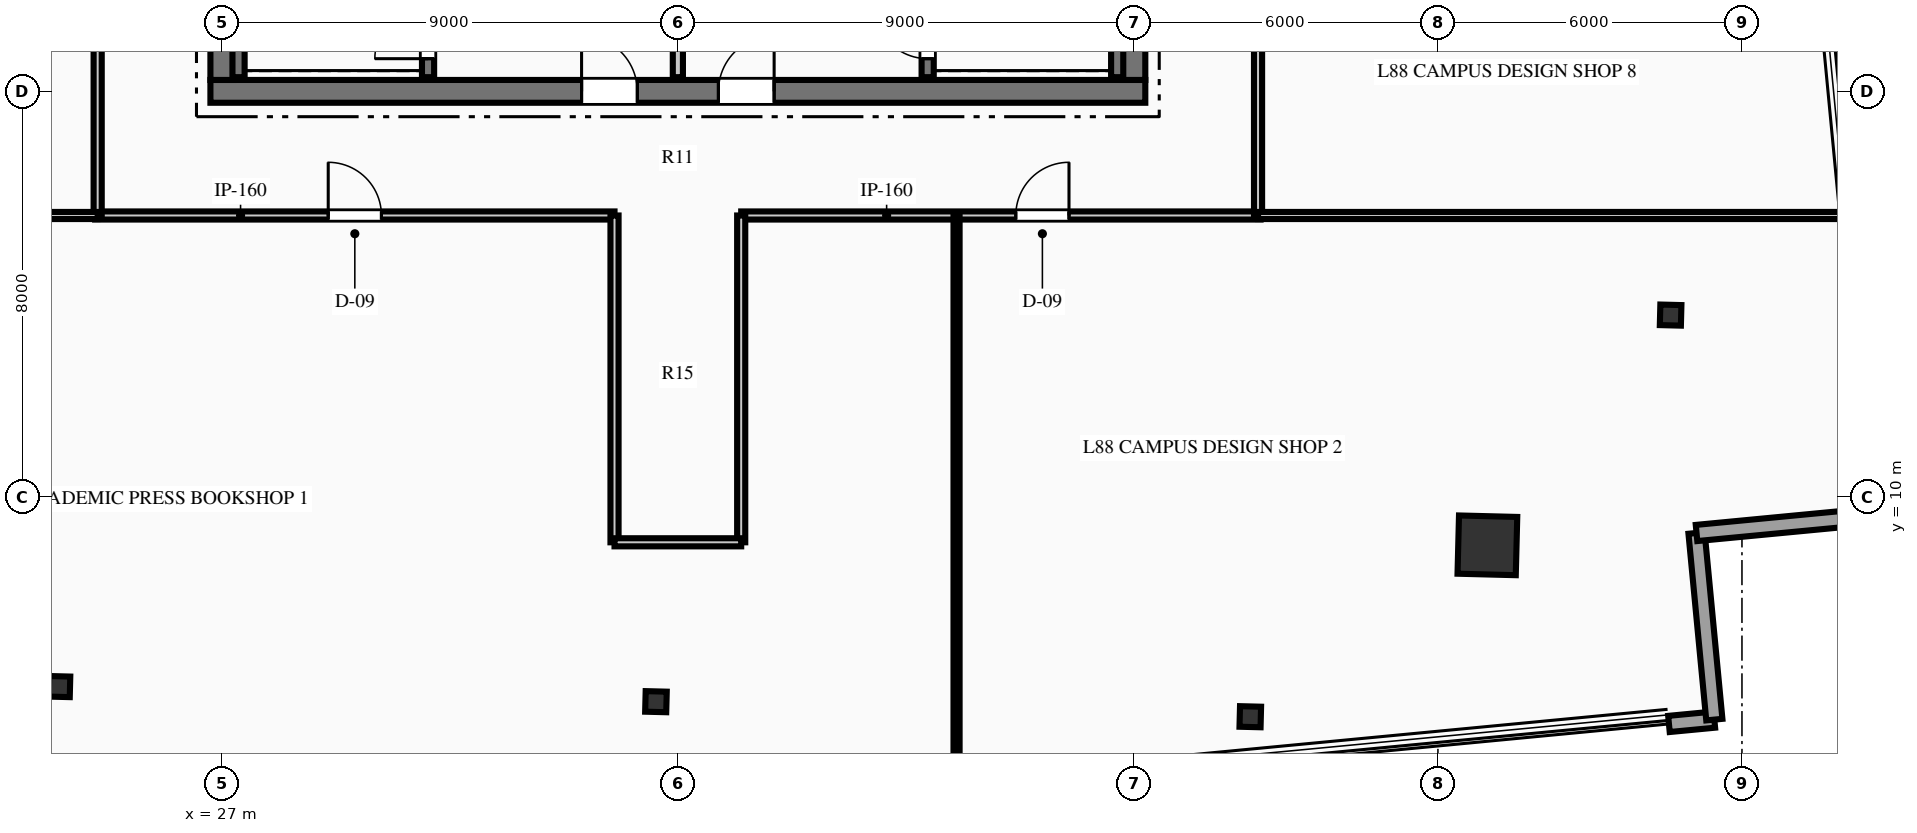
"""IFC4 building model, lengths in metres.
Left out: names, types, materials, properties, quantities, classifications, styles, units other than length and angle.
Written with IfcOpenShell. Run it as: python <this file> out.ifc"""

import sys

from ifc_helpers import new_model, si_unit, direction, frame, frame_2d, origin, origin_2d, place, context, subcontext, project, spatial, rectangle, hollow_rectangle, i_section, extrude, element, fill, save


model = new_model("IFC4")
c1 = context("Model", 3, precision=1e-05, world=origin(), true_north=direction((0.0, 1.0)))
c2 = subcontext(c1, "Body", "Model", "MODEL_VIEW")
j1 = project(units=[si_unit("LENGTHUNIT", "METRE"), si_unit("PLANEANGLEUNIT", "RADIAN")], contexts=[c1])
p1 = place(None, origin())
s1 = spatial("IfcSite", under=j1, at=p1, CompositionType="ELEMENT")
p2 = place(p1, origin())
s2 = spatial("IfcBuilding", under=s1, at=p2, CompositionType="ELEMENT")
p3 = place(p2, frame((0.0, 0.0, 347.7)))
s3 = spatial("IfcBuildingStorey", under=s2, at=p3, CompositionType="ELEMENT", Elevation=347.7)
p4 = place(p3, frame((26.775, 18.0, 0.0), z_axis=(0.0, 0.0, 1.0), x_axis=(1.0, 0.0, 0.0)))
e1 = element("IfcWall", 1, at=p4, inside=s3, PredefinedType="SHEAR", context=c2, shape_type="SweptSolid", body=[
    extrude(rectangle(XDim=18.45, YDim=0.45, at=frame_2d((9.225, 0.0))), origin(), (0.0, 0.0, 1.0), 4.5),
])
p5 = place(p4, frame((7.325, 0.0, 0.0)))
e2 = element("IfcOpeningElement", 2, at=p5, cuts=e1, PredefinedType="OPENING", context=c2, shape_type="SweptSolid", body=[
    extrude(rectangle(XDim=1.1, YDim=2.15, at=frame_2d((0.55, 1.075))), frame((0.0, 0.235, 0.0), z_axis=(0.0, -1.0, 0.0), x_axis=(1.0, 0.0, 0.0)), (0.0, 0.0, 1.0), 0.47),
])
p6 = place(p4, frame((10.025, 0.0, 0.0)))
e3 = element("IfcOpeningElement", 3, at=p6, cuts=e1, PredefinedType="OPENING", context=c2, shape_type="SweptSolid", body=[
    extrude(rectangle(XDim=1.1, YDim=2.15, at=frame_2d((0.55, 1.075))), frame((0.0, 0.235, 0.0), z_axis=(0.0, -1.0, 0.0), x_axis=(1.0, 0.0, 0.0)), (0.0, 0.0, 1.0), 0.47),
])
p7 = place(p3, frame((27.0, 18.225, 0.0), z_axis=(0.0, 0.0, 1.0), x_axis=(0.0, 1.0, 0.0)))
e4 = element("IfcWall", 4, at=p7, inside=s3, PredefinedType="SHEAR", context=c2, shape_type="SweptSolid", body=[
    extrude(rectangle(XDim=15.55, YDim=0.45, at=frame_2d((7.775, 0.0))), origin(), (0.0, 0.0, 1.0), 4.5),
])
p8 = place(p7, frame((10.015, 0.0, 0.0)))
e5 = element("IfcOpeningElement", 5, at=p8, cuts=e4, PredefinedType="OPENING", context=c2, shape_type="SweptSolid", body=[
    extrude(rectangle(XDim=1.4, YDim=2.2, at=frame_2d((0.7, 1.1))), frame((0.0, 0.235, 0.0), z_axis=(0.0, -1.0, 0.0), x_axis=(1.0, 0.0, 0.0)), (0.0, 0.0, 1.0), 0.47),
])
p9 = place(p3, frame((45.0, 18.225, 0.0), z_axis=(0.0, 0.0, 1.0), x_axis=(0.0, 1.0, 0.0)))
e6 = element("IfcWall", 6, at=p9, inside=s3, PredefinedType="SHEAR", context=c2, shape_type="SweptSolid", body=[
    extrude(rectangle(XDim=15.55, YDim=0.45, at=frame_2d((7.775, 0.0))), origin(), (0.0, 0.0, 1.0), 4.5),
])
p10 = place(p9, frame((10.015, 0.0, 0.0)))
e7 = element("IfcOpeningElement", 7, at=p10, cuts=e6, PredefinedType="OPENING", context=c2, shape_type="SweptSolid", body=[
    extrude(rectangle(XDim=1.4, YDim=2.2, at=frame_2d((0.7, 1.1))), frame((0.0, 0.235, 0.0), z_axis=(0.0, -1.0, 0.0), x_axis=(1.0, 0.0, 0.0)), (0.0, 0.0, 1.0), 0.47),
])
p11 = place(p3, frame((31.07, 18.28, 0.0), z_axis=(0.0, 0.0, 1.0), x_axis=(0.0, 1.0, 0.0)))
e8 = element("IfcWall", 8, at=p11, inside=s3, PredefinedType="SHEAR", context=c2, shape_type="SweptSolid", body=[
    extrude(rectangle(XDim=8.26, YDim=0.24, at=frame_2d((4.13, 0.0))), origin(), (0.0, 0.0, 1.0), 4.5),
])
p12 = place(p11, frame((0.365, 0.0, 0.0)))
e9 = element("IfcOpeningElement", 9, at=p12, cuts=e8, PredefinedType="OPENING", context=c2, shape_type="SweptSolid", body=[
    extrude(rectangle(XDim=1.05, YDim=2.15, at=frame_2d((0.525, 1.075))), frame((0.0, 0.13, 0.0), z_axis=(0.0, -1.0, 0.0), x_axis=(1.0, 0.0, 0.0)), (0.0, 0.0, 1.0), 0.26),
])
p13 = place(p3, frame((27.33, 18.28, 0.0), z_axis=(0.0, 0.0, 1.0), x_axis=(0.0, 1.0, 0.0)))
e10 = element("IfcWall", 10, at=p13, inside=s3, PredefinedType="SHEAR", context=c2, shape_type="SweptSolid", body=[
    extrude(rectangle(XDim=8.26, YDim=0.24, at=frame_2d((4.13, 0.0))), origin(), (0.0, 0.0, 1.0), 4.5),
])
p14 = place(p3, frame((40.93, 18.28, 0.0), z_axis=(0.0, 0.0, 1.0), x_axis=(0.0, 1.0, 0.0)))
e11 = element("IfcWall", 11, at=p14, inside=s3, PredefinedType="SHEAR", context=c2, shape_type="SweptSolid", body=[
    extrude(rectangle(XDim=8.26, YDim=0.24, at=frame_2d((4.13, 0.0))), origin(), (0.0, 0.0, 1.0), 4.5),
])
p15 = place(p14, frame((0.365, 0.0, 0.0)))
e12 = element("IfcOpeningElement", 12, at=p15, cuts=e11, PredefinedType="OPENING", context=c2, shape_type="SweptSolid", body=[
    extrude(rectangle(XDim=1.05, YDim=2.15, at=frame_2d((0.525, 1.075))), frame((0.0, 0.13, 0.0), z_axis=(0.0, -1.0, 0.0), x_axis=(1.0, 0.0, 0.0)), (0.0, 0.0, 1.0), 0.26),
])
p16 = place(p3, frame((44.67, 18.28, 0.0), z_axis=(0.0, 0.0, 1.0), x_axis=(0.0, 1.0, 0.0)))
e13 = element("IfcWall", 13, at=p16, inside=s3, PredefinedType="SHEAR", context=c2, shape_type="SweptSolid", body=[
    extrude(rectangle(XDim=8.26, YDim=0.24, at=frame_2d((4.13, 0.0))), origin(), (0.0, 0.0, 1.0), 4.5),
])
p17 = place(p3, frame((51.976, 9.04, 0.0), z_axis=(0.0, 0.0, 1.0), x_axis=(0.025304572866, 0.999679788028, 0.0)))
e14 = element("IfcColumn", 14, at=p17, inside=s3, PredefinedType="COLUMN", context=c2, shape_type="SweptSolid", body=[
    extrude(hollow_rectangle(XDim=1.15, YDim=1.15, WallThickness=0.05, at=origin_2d()), origin(), (0.0, 0.0, 1.0), 4.5),
])
for number, where, z_axis, x_axis in (
    (15, (55.592, 13.584, 0.0), (0.0, 0.0, 1.0), (0.025, 1.0, 0.0)),
    (16, (23.796, 6.252, 0.0), (0.0, 0.0, 1.0), (0.025, 1.0, 0.0)),
    (17, (35.568, 5.955, 0.0), (0.0, 0.0, 1.0), (0.025, 1.0, 0.0)),
    (18, (47.297, 5.658, 0.0), (0.0, 0.0, 1.0), (0.025, 1.0, 0.0)),
):
    element("IfcColumn", number, at=place(p3, frame(where, z_axis=z_axis, x_axis=x_axis)), inside=s3, PredefinedType="COLUMN", context=c2, shape_type="SweptSolid", body=[
        extrude(i_section(OverallWidth=0.406, OverallDepth=0.416, WebThickness=0.03, FlangeThickness=0.048, at=origin_2d()), origin(), (0.0, 0.0, 1.0), 4.5),
    ])
p18 = place(p3, frame((56.455, 5.601, 0.0), z_axis=(0.0, 0.0, 1.0), x_axis=(-0.995455142934, -0.095231604026, 0.0)))
e19 = element("IfcWall", 19, at=p18, inside=s3, PredefinedType="STANDARD", context=c2, shape_type="SweptSolid", body=[
    extrude(rectangle(XDim=0.9, YDim=0.32, at=frame_2d((0.45, 0.0))), origin(), (0.0, 0.0, 1.0), 4.1),
])
p19 = place(p3, frame((56.104, 9.284, 0.0), z_axis=(0.0, 0.0, 1.0), x_axis=(0.094955449528, -0.995481522985, 0.0)))
e20 = element("IfcWall", 20, at=p19, inside=s3, PredefinedType="STANDARD", context=c2, shape_type="SweptSolid", body=[
    extrude(rectangle(XDim=3.7, YDim=0.32, at=frame_2d((1.85, 0.0))), origin(), (0.0, 0.0, 1.0), 4.1),
])
p20 = place(p3, frame((59.787, 9.635, 0.0), z_axis=(0.0, 0.0, 1.0), x_axis=(-0.995475879086, -0.095014599714, 0.0)))
e21 = element("IfcWall", 21, at=p20, inside=s3, PredefinedType="STANDARD", context=c2, shape_type="SweptSolid", body=[
    extrude(rectangle(XDim=3.7, YDim=0.32, at=frame_2d((1.85, 0.0))), origin(), (0.0, 0.0, 1.0), 4.1),
])
p21 = place(p3, frame((36.0, 18.28, 0.0), z_axis=(0.0, 0.0, 1.0), x_axis=(0.0, 1.0, 0.0)))
e22 = element("IfcWall", 22, at=p21, inside=s3, PredefinedType="PARTITIONING", context=c2, shape_type="SweptSolid", body=[
    extrude(rectangle(XDim=3.77, YDim=0.2, at=frame_2d((1.885, 0.0))), origin(), (0.0, 0.0, 1.0), 4.1),
])
p22 = place(p3, frame((24.5, 15.55, 0.0), z_axis=(0.0, 0.0, 1.0), x_axis=(1.0, 0.0, 0.0)))
e23 = element("IfcWall", 23, at=p22, inside=s3, PredefinedType="PARTITIONING", context=c2, shape_type="SweptSolid", body=[
    extrude(rectangle(XDim=10.25, YDim=0.16, at=frame_2d((5.125, 0.0))), origin(), (0.0, 0.0, 1.0), 4.1),
])
p23 = place(p22, frame((4.6, 0.0, 0.0)))
e24 = element("IfcOpeningElement", 24, at=p23, cuts=e23, PredefinedType="OPENING", context=c2, shape_type="SweptSolid", body=[
    extrude(rectangle(XDim=1.05, YDim=2.15, at=frame_2d((0.525, 1.075))), frame((0.0, 0.09, 0.0), z_axis=(0.0, -1.0, 0.0), x_axis=(1.0, 0.0, 0.0)), (0.0, 0.0, 1.0), 0.18),
])
p24 = place(p3, frame((37.25, 15.55, 0.0), z_axis=(0.0, 0.0, 1.0), x_axis=(1.0, 0.0, 0.0)))
e25 = element("IfcWall", 25, at=p24, inside=s3, PredefinedType="PARTITIONING", context=c2, shape_type="SweptSolid", body=[
    extrude(rectangle(XDim=10.25, YDim=0.16, at=frame_2d((5.125, 0.0))), origin(), (0.0, 0.0, 1.0), 4.1),
])
p25 = place(p24, frame((5.419, 0.0, 0.0)))
e26 = element("IfcOpeningElement", 26, at=p25, cuts=e25, PredefinedType="OPENING", context=c2, shape_type="SweptSolid", body=[
    extrude(rectangle(XDim=1.05, YDim=2.15, at=frame_2d((0.525, 1.075))), frame((0.0, 0.09, 0.0), z_axis=(0.0, -1.0, 0.0), x_axis=(1.0, 0.0, 0.0)), (0.0, 0.0, 1.0), 0.18),
])
p26 = place(p3, frame((24.55, 15.55, 0.0), z_axis=(0.0, 0.0, 1.0), x_axis=(0.0, 1.0, 0.0)))
e27 = element("IfcWall", 27, at=p26, inside=s3, PredefinedType="PARTITIONING", context=c2, shape_type="SweptSolid", body=[
    extrude(rectangle(XDim=9.2, YDim=0.16, at=frame_2d((4.6, 0.0))), origin(), (0.0, 0.0, 1.0), 4.1),
])
p27 = place(p26, frame((3.543, 0.0, 0.0)))
e28 = element("IfcOpeningElement", 28, at=p27, cuts=e27, PredefinedType="OPENING", context=c2, shape_type="SweptSolid", body=[
    extrude(rectangle(XDim=1.05, YDim=2.15, at=frame_2d((0.525, 1.075))), frame((0.0, 0.09, 0.0), z_axis=(0.0, -1.0, 0.0), x_axis=(1.0, 0.0, 0.0)), (0.0, 0.0, 1.0), 0.18),
])
p28 = place(p3, frame((47.45, 15.55, 0.0), z_axis=(0.0, 0.0, 1.0), x_axis=(0.0, 1.0, 0.0)))
e29 = element("IfcWall", 29, at=p28, inside=s3, PredefinedType="PARTITIONING", context=c2, shape_type="SweptSolid", body=[
    extrude(rectangle(XDim=9.2, YDim=0.16, at=frame_2d((4.6, 0.0))), origin(), (0.0, 0.0, 1.0), 4.1),
])
p29 = place(p28, frame((3.543, 0.0, 0.0)))
e30 = element("IfcOpeningElement", 30, at=p29, cuts=e29, PredefinedType="OPENING", context=c2, shape_type="SweptSolid", body=[
    extrude(rectangle(XDim=1.05, YDim=2.15, at=frame_2d((0.525, 1.075))), frame((0.0, 0.09, 0.0), z_axis=(0.0, -1.0, 0.0), x_axis=(1.0, 0.0, 0.0)), (0.0, 0.0, 1.0), 0.18),
])
for number, where, z_axis, x_axis in (
    (31, (34.75, 9.1, 0.0), (0.0, 0.0, 1.0), (0.0, 1.0, 0.0)),
    (32, (37.25, 9.1, 0.0), (0.0, 0.0, 1.0), (0.0, 1.0, 0.0)),
):
    element("IfcWall", number, at=place(p3, frame(where, z_axis=z_axis, x_axis=x_axis)), inside=s3, PredefinedType="PARTITIONING", context=c2, shape_type="SweptSolid", body=[
        extrude(rectangle(XDim=6.45, YDim=0.16, at=frame_2d((3.225, 0.0))), origin(), (0.0, 0.0, 1.0), 4.1),
    ])
p30 = place(p3, frame((34.75, 9.1, 0.0), z_axis=(0.0, 0.0, 1.0), x_axis=(1.0, 0.0, 0.0)))
e33 = element("IfcWall", 33, at=p30, inside=s3, PredefinedType="PARTITIONING", context=c2, shape_type="SweptSolid", body=[
    extrude(rectangle(XDim=2.5, YDim=0.16, at=frame_2d((1.25, 0.0))), origin(), (0.0, 0.0, 1.0), 4.1),
])
p31 = place(p3, frame((14.988, 15.55, 0.0), z_axis=(0.0, 0.0, 1.0), x_axis=(1.0, 0.0, 0.0)))
e34 = element("IfcWall", 34, at=p31, inside=s3, PredefinedType="PARTITIONING", context=c2, shape_type="SweptSolid", body=[
    extrude(rectangle(XDim=9.562, YDim=0.14, at=frame_2d((4.781, 0.0))), origin(), (0.0, 0.0, 1.0), 3.478),
])
p32 = place(p3, frame((47.45, 15.55, 0.0), z_axis=(0.0, 0.0, 1.0), x_axis=(1.0, 0.0, 0.0)))
e35 = element("IfcWall", 35, at=p32, inside=s3, PredefinedType="PARTITIONING", context=c2, shape_type="SweptSolid", body=[
    extrude(rectangle(XDim=11.732, YDim=0.14, at=frame_2d((5.866, 0.0))), origin(), (0.0, 0.0, 1.0), 3.689),
])
p33 = place(p3, frame((41.5, 4.214, 0.0), z_axis=(0.0, 0.0, 1.0), x_axis=(0.0, 1.0, 0.0)))
e36 = element("IfcWall", 36, at=p33, inside=s3, PredefinedType="PARTITIONING", context=c2, shape_type="SweptSolid", body=[
    extrude(rectangle(XDim=11.336, YDim=0.12, at=frame_2d((5.668, 0.0))), origin(), (0.0, 0.0, 1.0), 4.1),
])
p34 = place(p12, origin())
e37 = element("IfcDoor", 37, at=p34, inside=s3, OperationType="SINGLE_SWING_LEFT", PredefinedType="DOOR", context=c2, shape_type="SweptSolid", body=[
    extrude(rectangle(XDim=1.05, YDim=2.15, at=frame_2d((0.525, 1.075))), frame((0.0, 0.025, 0.0), z_axis=(0.0, -1.0, 0.0), x_axis=(1.0, 0.0, 0.0)), (0.0, 0.0, 1.0), 0.05),
])
fill(e9, e37)
p35 = place(p15, origin())
e38 = element("IfcDoor", 38, at=p35, inside=s3, OperationType="SINGLE_SWING_RIGHT", PredefinedType="DOOR", context=c2, shape_type="SweptSolid", body=[
    extrude(rectangle(XDim=1.05, YDim=2.15, at=frame_2d((0.525, 1.075))), frame((0.0, 0.025, 0.0), z_axis=(0.0, -1.0, 0.0), x_axis=(1.0, 0.0, 0.0)), (0.0, 0.0, 1.0), 0.05),
])
fill(e12, e38)
p36 = place(p5, origin())
e39 = element("IfcDoor", 39, at=p36, inside=s3, OperationType="SINGLE_SWING_LEFT", PredefinedType="DOOR", context=c2, shape_type="SweptSolid", body=[
    extrude(rectangle(XDim=1.1, YDim=2.15, at=frame_2d((0.55, 1.075))), frame((0.0, 0.025, 0.0), z_axis=(0.0, -1.0, 0.0), x_axis=(1.0, 0.0, 0.0)), (0.0, 0.0, 1.0), 0.05),
])
fill(e2, e39)
p37 = place(p6, origin())
e40 = element("IfcDoor", 40, at=p37, inside=s3, OperationType="SINGLE_SWING_RIGHT", PredefinedType="DOOR", context=c2, shape_type="SweptSolid", body=[
    extrude(rectangle(XDim=1.1, YDim=2.15, at=frame_2d((0.55, 1.075))), frame((0.0, 0.025, 0.0), z_axis=(0.0, -1.0, 0.0), x_axis=(1.0, 0.0, 0.0)), (0.0, 0.0, 1.0), 0.05),
])
fill(e3, e40)
p38 = place(p23, origin())
e41 = element("IfcDoor", 41, at=p38, inside=s3, OperationType="SINGLE_SWING_LEFT", PredefinedType="DOOR", context=c2, shape_type="SweptSolid", body=[
    extrude(rectangle(XDim=1.05, YDim=2.15, at=frame_2d((0.525, 1.075))), frame((0.0, 0.025, 0.0), z_axis=(0.0, -1.0, 0.0), x_axis=(1.0, 0.0, 0.0)), (0.0, 0.0, 1.0), 0.05),
])
fill(e24, e41)
p39 = place(p25, origin())
e42 = element("IfcDoor", 42, at=p39, inside=s3, OperationType="SINGLE_SWING_RIGHT", PredefinedType="DOOR", context=c2, shape_type="SweptSolid", body=[
    extrude(rectangle(XDim=1.05, YDim=2.15, at=frame_2d((0.525, 1.075))), frame((0.0, 0.025, 0.0), z_axis=(0.0, -1.0, 0.0), x_axis=(1.0, 0.0, 0.0)), (0.0, 0.0, 1.0), 0.05),
])
fill(e26, e42)
save(model, sys.argv[1])
